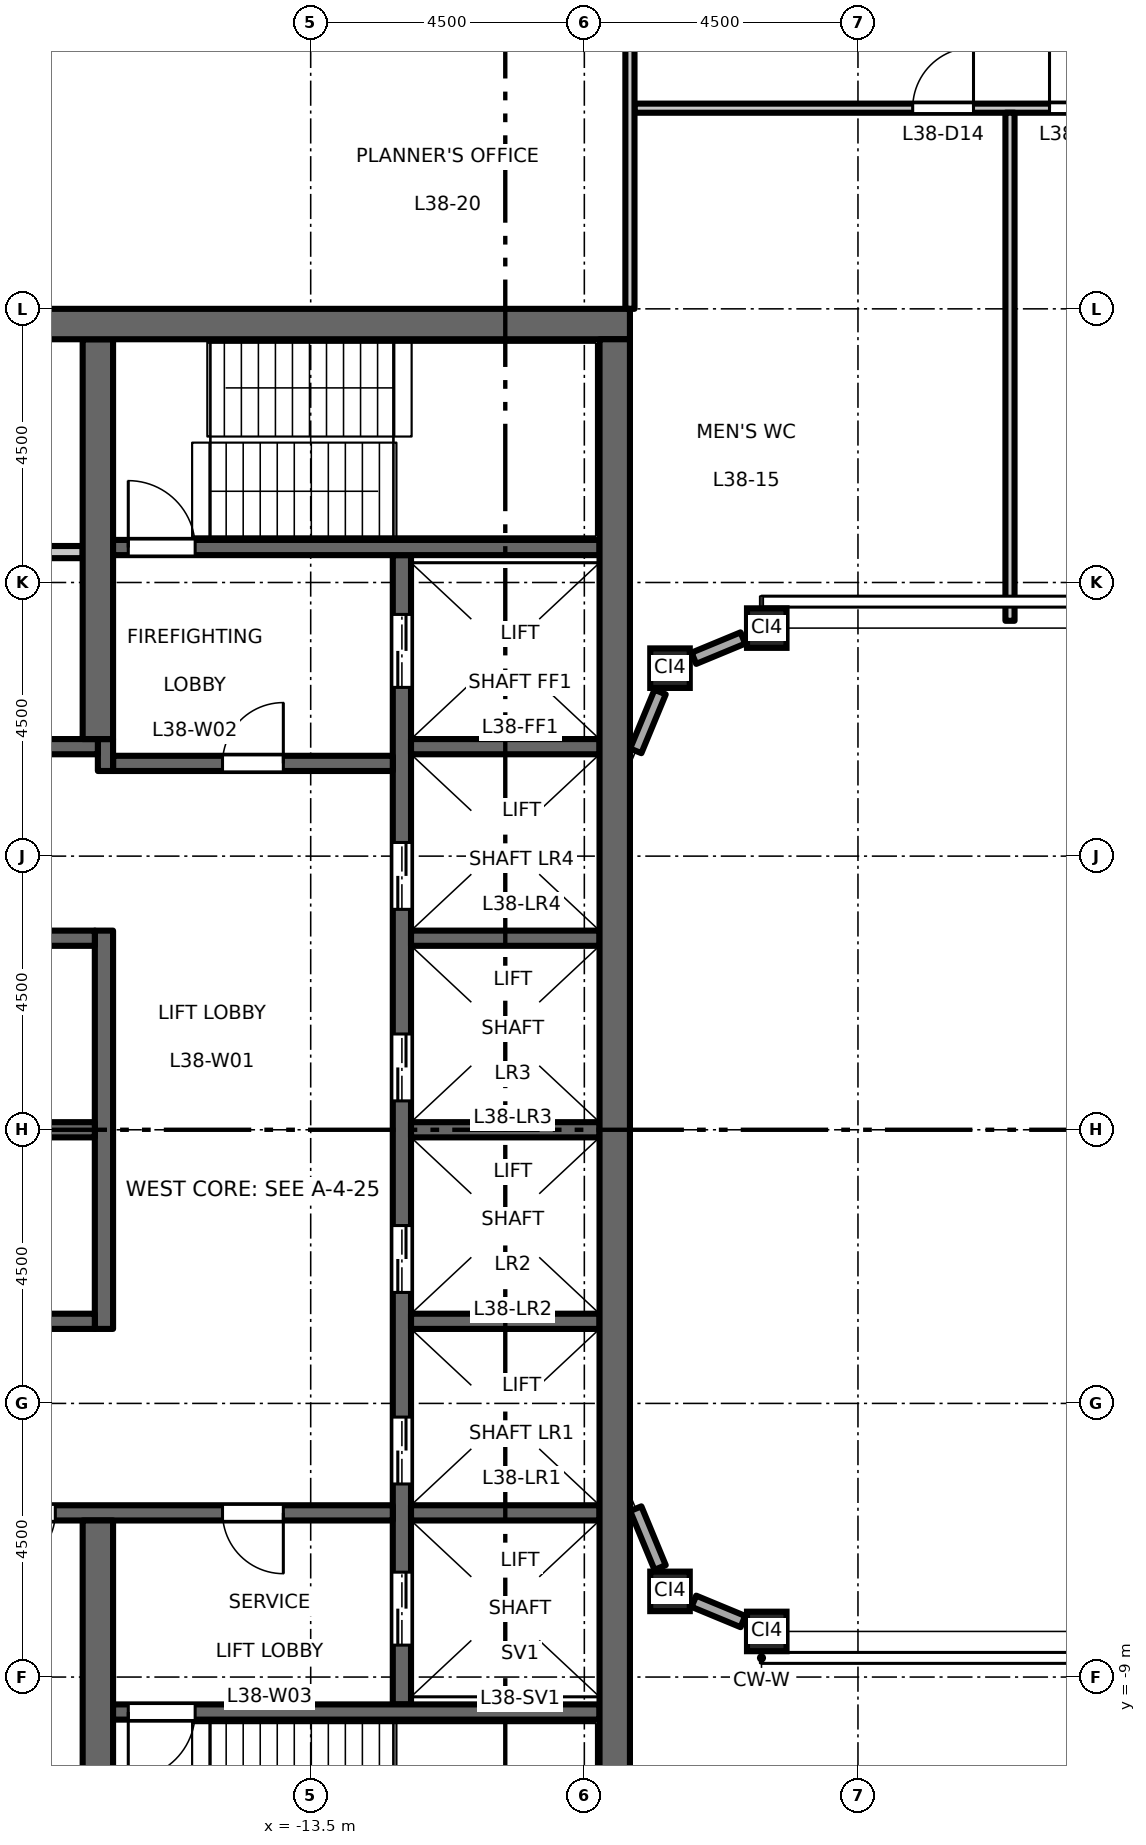
"""IFC4 building model, lengths in metres.
Left out: names, types, materials, properties, quantities, classifications, styles, units other than length and angle.
Written with IfcOpenShell. Run it as: python <this file> out.ifc"""

import sys

from ifc_helpers import new_model, si_unit, direction, frame, frame_2d, origin, origin_2d, place, context, subcontext, project, spatial, rectangle, hollow_rectangle, extrude, element, fill, save


model = new_model("IFC4")
c1 = context("Model", 3, precision=1e-05, world=origin(), true_north=direction((0.0, 1.0)))
c2 = subcontext(c1, "Body", "Model", "MODEL_VIEW")
j1 = project(units=[si_unit("LENGTHUNIT", "METRE"), si_unit("PLANEANGLEUNIT", "RADIAN")], contexts=[c1])
p1 = place(None, origin())
s1 = spatial("IfcSite", under=j1, at=p1, CompositionType="ELEMENT")
p2 = place(p1, origin())
s2 = spatial("IfcBuilding", under=s1, at=p2, CompositionType="ELEMENT")
p3 = place(p2, frame((0.0, 0.0, 176.7)))
s3 = spatial("IfcBuildingStorey", under=s2, at=p3, CompositionType="ELEMENT", Elevation=176.7)
for number, where, z_axis, x_axis in (
    (1, (-7.591, -7.591, 0.0), (0.0, 0.0, 1.0), (1.0, 0.0, 0.0)),
    (2, (-6.0, -8.25, 0.0), (0.0, 0.0, 1.0), (1.0, 0.0, 0.0)),
    (3, (-7.591, 7.591, 0.0), (0.0, 0.0, 1.0), (1.0, 0.0, 0.0)),
    (4, (-6.0, 8.25, 0.0), (0.0, 0.0, 1.0), (1.0, 0.0, 0.0)),
):
    element("IfcColumn", number, at=place(p3, frame(where, z_axis=z_axis, x_axis=x_axis)), inside=s3, PredefinedType="COLUMN", context=c2, shape_type="SweptSolid", body=[
        extrude(hollow_rectangle(XDim=0.65, YDim=0.65, WallThickness=0.036, at=origin_2d()), origin(), (0.0, 0.0, 1.0), 4.5),
    ])
p4 = place(p3, frame((-12.0, -9.45, 0.0), z_axis=(0.0, 0.0, 1.0), x_axis=(0.0, 1.0, 0.0)))
e5 = element("IfcWall", 5, at=p4, inside=s3, PredefinedType="SHEAR", context=c2, shape_type="SweptSolid", body=[
    extrude(rectangle(XDim=18.9, YDim=0.3, at=frame_2d((9.45, 0.0))), origin(), (0.0, 0.0, 1.0), 4.3),
])
p5 = place(p4, frame((3.625, 0.0, 0.0)))
e6 = element("IfcOpeningElement", 6, at=p5, cuts=e5, PredefinedType="OPENING", context=c2, shape_type="SweptSolid", body=[
    extrude(rectangle(XDim=1.1, YDim=2.1, at=frame_2d((0.55, 1.05))), frame((0.0, 0.16, 0.0), z_axis=(0.0, -1.0, 0.0), x_axis=(1.0, 0.0, 0.0)), (0.0, 0.0, 1.0), 0.32),
])
p6 = place(p4, frame((6.775, 0.0, 0.0)))
e7 = element("IfcOpeningElement", 7, at=p6, cuts=e5, PredefinedType="OPENING", context=c2, shape_type="SweptSolid", body=[
    extrude(rectangle(XDim=1.1, YDim=2.1, at=frame_2d((0.55, 1.05))), frame((0.0, 0.16, 0.0), z_axis=(0.0, -1.0, 0.0), x_axis=(1.0, 0.0, 0.0)), (0.0, 0.0, 1.0), 0.32),
])
p7 = place(p4, frame((9.925, 0.0, 0.0)))
e8 = element("IfcOpeningElement", 8, at=p7, cuts=e5, PredefinedType="OPENING", context=c2, shape_type="SweptSolid", body=[
    extrude(rectangle(XDim=1.1, YDim=2.1, at=frame_2d((0.55, 1.05))), frame((0.0, 0.16, 0.0), z_axis=(0.0, -1.0, 0.0), x_axis=(1.0, 0.0, 0.0)), (0.0, 0.0, 1.0), 0.32),
])
p8 = place(p4, frame((13.075, 0.0, 0.0)))
e9 = element("IfcOpeningElement", 9, at=p8, cuts=e5, PredefinedType="OPENING", context=c2, shape_type="SweptSolid", body=[
    extrude(rectangle(XDim=1.1, YDim=2.1, at=frame_2d((0.55, 1.05))), frame((0.0, 0.16, 0.0), z_axis=(0.0, -1.0, 0.0), x_axis=(1.0, 0.0, 0.0)), (0.0, 0.0, 1.0), 0.32),
])
p9 = place(p4, frame((16.725, 0.0, 0.0)))
e10 = element("IfcOpeningElement", 10, at=p9, cuts=e5, PredefinedType="OPENING", context=c2, shape_type="SweptSolid", body=[
    extrude(rectangle(XDim=1.2, YDim=2.1, at=frame_2d((0.6, 1.05))), frame((0.0, 0.16, 0.0), z_axis=(0.0, -1.0, 0.0), x_axis=(1.0, 0.0, 0.0)), (0.0, 0.0, 1.0), 0.32),
])
p10 = place(p4, frame((0.975, 0.0, 0.0)))
e11 = element("IfcOpeningElement", 11, at=p10, cuts=e5, PredefinedType="OPENING", context=c2, shape_type="SweptSolid", body=[
    extrude(rectangle(XDim=1.2, YDim=2.1, at=frame_2d((0.6, 1.05))), frame((0.0, 0.16, 0.0), z_axis=(0.0, -1.0, 0.0), x_axis=(1.0, 0.0, 0.0)), (0.0, 0.0, 1.0), 0.32),
])
p11 = place(p3, frame((-12.15, 6.025, 0.0), z_axis=(0.0, 0.0, 1.0), x_axis=(-1.0, 0.0, 0.0)))
e12 = element("IfcWall", 12, at=p11, inside=s3, PredefinedType="SHEAR", context=c2, shape_type="SweptSolid", body=[
    extrude(rectangle(XDim=4.6, YDim=0.25, at=frame_2d((2.3, 0.0))), origin(), (0.0, 0.0, 1.0), 4.3),
])
p12 = place(p11, frame((1.8, 0.0, 0.0)))
e13 = element("IfcOpeningElement", 13, at=p12, cuts=e12, PredefinedType="OPENING", context=c2, shape_type="SweptSolid", body=[
    extrude(rectangle(XDim=1.0, YDim=2.1, at=frame_2d((0.5, 1.05))), frame((0.0, 0.135, 0.0), z_axis=(0.0, -1.0, 0.0), x_axis=(1.0, 0.0, 0.0)), (0.0, 0.0, 1.0), 0.27),
])
p13 = place(p3, frame((-16.875, 5.9, 0.0), z_axis=(0.0, 0.0, 1.0), x_axis=(0.0, 1.0, 0.0)))
e14 = element("IfcWall", 14, at=p13, inside=s3, PredefinedType="SHEAR", context=c2, shape_type="SweptSolid", body=[
    extrude(rectangle(XDim=0.525, YDim=0.25, at=frame_2d((0.263, 0.0))), origin(), (0.0, 0.0, 1.0), 4.3),
])
p14 = place(p3, frame((-17.0, 6.3, 0.0), z_axis=(0.0, 0.0, 1.0), x_axis=(-1.0, 0.0, 0.0)))
e15 = element("IfcWall", 15, at=p14, inside=s3, PredefinedType="SHEAR", context=c2, shape_type="SweptSolid", body=[
    extrude(rectangle(XDim=4.25, YDim=0.25, at=frame_2d((2.125, 0.0))), origin(), (0.0, 0.0, 1.0), 4.3),
])
p15 = place(p14, frame((1.8, 0.0, 0.0)))
e16 = element("IfcOpeningElement", 16, at=p15, cuts=e15, PredefinedType="OPENING", context=c2, shape_type="SweptSolid", body=[
    extrude(rectangle(XDim=0.9, YDim=2.1, at=frame_2d((0.45, 1.05))), frame((0.0, 0.135, 0.0), z_axis=(0.0, -1.0, 0.0), x_axis=(1.0, 0.0, 0.0)), (0.0, 0.0, 1.0), 0.27),
])
p16 = place(p3, frame((-12.15, -6.3, 0.0), z_axis=(0.0, 0.0, 1.0), x_axis=(-1.0, 0.0, 0.0)))
e17 = element("IfcWall", 17, at=p16, inside=s3, PredefinedType="SHEAR", context=c2, shape_type="SweptSolid", body=[
    extrude(rectangle(XDim=9.1, YDim=0.25, at=frame_2d((4.55, 0.0))), origin(), (0.0, 0.0, 1.0), 4.3),
])
p17 = place(p16, frame((1.8, 0.0, 0.0)))
e18 = element("IfcOpeningElement", 18, at=p17, cuts=e17, PredefinedType="OPENING", context=c2, shape_type="SweptSolid", body=[
    extrude(rectangle(XDim=1.0, YDim=2.1, at=frame_2d((0.5, 1.05))), frame((0.0, 0.135, 0.0), z_axis=(0.0, -1.0, 0.0), x_axis=(1.0, 0.0, 0.0)), (0.0, 0.0, 1.0), 0.27),
])
p18 = place(p16, frame((5.55, 0.0, 0.0)))
e19 = element("IfcOpeningElement", 19, at=p18, cuts=e17, PredefinedType="OPENING", context=c2, shape_type="SweptSolid", body=[
    extrude(rectangle(XDim=0.9, YDim=2.1, at=frame_2d((0.45, 1.05))), frame((0.0, 0.135, 0.0), z_axis=(0.0, -1.0, 0.0), x_axis=(1.0, 0.0, 0.0)), (0.0, 0.0, 1.0), 0.27),
])
p19 = place(p16, frame((7.55, 0.0, 0.0)))
e20 = element("IfcOpeningElement", 20, at=p19, cuts=e17, PredefinedType="OPENING", context=c2, shape_type="SweptSolid", body=[
    extrude(rectangle(XDim=0.9, YDim=2.1, at=frame_2d((0.45, 1.05))), frame((0.0, 0.135, 0.0), z_axis=(0.0, -1.0, 0.0), x_axis=(1.0, 0.0, 0.0)), (0.0, 0.0, 1.0), 0.27),
])
p20 = place(p3, frame((-17.25, 9.5, 0.0), z_axis=(0.0, 0.0, 1.0), x_axis=(-1.0, 0.0, 0.0)))
e21 = element("IfcWall", 21, at=p20, inside=s3, PredefinedType="PARTITIONING", context=c2, shape_type="SweptSolid", body=[
    extrude(rectangle(XDim=4.0, YDim=0.2, at=frame_2d((2.0, 0.0))), origin(), (0.0, 0.0, 1.0), 4.3),
])
p21 = place(p3, frame((-16.9, -3.275, 0.0), z_axis=(0.0, 0.0, 1.0), x_axis=(0.0, 1.0, 0.0)))
e22 = element("IfcWall", 22, at=p21, inside=s3, PredefinedType="SHEAR", context=c2, shape_type="SweptSolid", body=[
    extrude(rectangle(XDim=6.55, YDim=0.3, at=frame_2d((3.275, 0.0))), origin(), (0.0, 0.0, 1.0), 4.3),
])
for number, where, z_axis, x_axis in (
    (23, (-17.05, 0.0, 0.0), (0.0, 0.0, 1.0), (-1.0, 0.0, 0.0)),
    (24, (-17.05, 3.15, 0.0), (0.0, 0.0, 1.0), (-1.0, 0.0, 0.0)),
    (25, (-17.05, -3.15, 0.0), (0.0, 0.0, 1.0), (-1.0, 0.0, 0.0)),
):
    element("IfcWall", number, at=place(p3, frame(where, z_axis=z_axis, x_axis=x_axis)), inside=s3, PredefinedType="SHEAR", context=c2, shape_type="SweptSolid", body=[
        extrude(rectangle(XDim=4.2, YDim=0.25, at=frame_2d((2.1, 0.0))), origin(), (0.0, 0.0, 1.0), 4.3),
    ])
for number, where, z_axis, x_axis in (
    (26, (-17.0, 6.425, 0.0), (0.0, 0.0, 1.0), (0.0, 1.0, 0.0)),
    (27, (-17.0, -13.0, 0.0), (0.0, 0.0, 1.0), (0.0, 1.0, 0.0)),
):
    element("IfcWall", number, at=place(p3, frame(where, z_axis=z_axis, x_axis=x_axis)), inside=s3, PredefinedType="SHEAR", context=c2, shape_type="SweptSolid", body=[
        extrude(rectangle(XDim=6.575, YDim=0.5, at=frame_2d((3.288, 0.0))), origin(), (0.0, 0.0, 1.0), 4.3),
    ])
for number, where, z_axis, x_axis in (
    (28, (-8.75, 0.0, 0.0), (0.0, 0.0, 1.0), (-1.0, 0.0, 0.0)),
    (29, (-8.75, 3.15, 0.0), (0.0, 0.0, 1.0), (-1.0, 0.0, 0.0)),
    (30, (-8.75, 6.3, 0.0), (0.0, 0.0, 1.0), (-1.0, 0.0, 0.0)),
    (31, (-8.75, -3.15, 0.0), (0.0, 0.0, 1.0), (-1.0, 0.0, 0.0)),
    (32, (-8.75, -6.3, 0.0), (0.0, 0.0, 1.0), (-1.0, 0.0, 0.0)),
):
    element("IfcWall", number, at=place(p3, frame(where, z_axis=z_axis, x_axis=x_axis)), inside=s3, PredefinedType="SHEAR", context=c2, shape_type="SweptSolid", body=[
        extrude(rectangle(XDim=3.1, YDim=0.25, at=frame_2d((1.55, 0.0))), origin(), (0.0, 0.0, 1.0), 4.3),
    ])
p22 = place(p3, frame((-8.75, 9.575, 0.0), z_axis=(0.0, 0.0, 1.0), x_axis=(-1.0, 0.0, 0.0)))
e33 = element("IfcWall", 33, at=p22, inside=s3, PredefinedType="SHEAR", context=c2, shape_type="SweptSolid", body=[
    extrude(rectangle(XDim=8.0, YDim=0.25, at=frame_2d((4.0, 0.0))), origin(), (0.0, 0.0, 1.0), 4.3),
])
p23 = place(p22, frame((6.65, 0.0, 0.0)))
e34 = element("IfcOpeningElement", 34, at=p23, cuts=e33, PredefinedType="OPENING", context=c2, shape_type="SweptSolid", body=[
    extrude(rectangle(XDim=1.1, YDim=2.1, at=frame_2d((0.55, 1.05))), frame((0.0, 0.135, 0.0), z_axis=(0.0, -1.0, 0.0), x_axis=(1.0, 0.0, 0.0)), (0.0, 0.0, 1.0), 0.27),
])
p24 = place(p3, frame((-8.75, -9.575, 0.0), z_axis=(0.0, 0.0, 1.0), x_axis=(-1.0, 0.0, 0.0)))
e35 = element("IfcWall", 35, at=p24, inside=s3, PredefinedType="SHEAR", context=c2, shape_type="SweptSolid", body=[
    extrude(rectangle(XDim=8.0, YDim=0.25, at=frame_2d((4.0, 0.0))), origin(), (0.0, 0.0, 1.0), 4.3),
])
p25 = place(p24, frame((6.65, 0.0, 0.0)))
e36 = element("IfcOpeningElement", 36, at=p25, cuts=e35, PredefinedType="OPENING", context=c2, shape_type="SweptSolid", body=[
    extrude(rectangle(XDim=1.1, YDim=2.1, at=frame_2d((0.55, 1.05))), frame((0.0, 0.135, 0.0), z_axis=(0.0, -1.0, 0.0), x_axis=(1.0, 0.0, 0.0)), (0.0, 0.0, 1.0), 0.27),
])
p26 = place(p3, frame((-8.25, 13.25, 0.0), z_axis=(0.0, 0.0, 1.0), x_axis=(-1.0, 0.0, 0.0)))
e37 = element("IfcWall", 37, at=p26, inside=s3, PredefinedType="SHEAR", context=c2, shape_type="SweptSolid", body=[
    extrude(rectangle(XDim=13.5, YDim=0.5, at=frame_2d((6.75, 0.0))), origin(), (0.0, 0.0, 1.0), 4.3),
])
p27 = place(p3, frame((-8.5, -13.0, 0.0), z_axis=(0.0, 0.0, 1.0), x_axis=(0.0, 1.0, 0.0)))
e38 = element("IfcWall", 38, at=p27, inside=s3, PredefinedType="SHEAR", context=c2, shape_type="SweptSolid", body=[
    extrude(rectangle(XDim=26.0, YDim=0.5, at=frame_2d((13.0, 0.0))), origin(), (0.0, 0.0, 1.0), 4.3),
])
p28 = place(p3, frame((-6.392, 8.087, 0.0), z_axis=(0.0, 0.0, 1.0), x_axis=(-0.923894108428, -0.382648241093, 0.0)))
e39 = element("IfcWall", 39, at=p28, inside=s3, PredefinedType="STANDARD", context=c2, shape_type="SweptSolid", body=[
    extrude(rectangle(XDim=0.873, YDim=0.2, at=frame_2d((0.437, 0.0))), origin(), (0.0, 0.0, 1.0), 3.776),
])
for number, where, z_axis, x_axis in (
    (40, (-7.753, 7.199, 0.0), (0.0, 0.0, 1.0), (-0.383, -0.924, 0.0)),
    (41, (-8.154, -6.231, 0.0), (0.0, 0.0, 1.0), (0.383, -0.924, 0.0)),
):
    element("IfcWall", number, at=place(p3, frame(where, z_axis=z_axis, x_axis=x_axis)), inside=s3, PredefinedType="STANDARD", context=c2, shape_type="SweptSolid", body=[
        extrude(rectangle(XDim=1.048, YDim=0.2, at=frame_2d((0.524, 0.0))), origin(), (0.0, 0.0, 1.0), 3.776),
    ])
p29 = place(p3, frame((-7.199, -7.753, 0.0), z_axis=(0.0, 0.0, 1.0), x_axis=(0.923894108428, -0.382648241093, 0.0)))
e42 = element("IfcWall", 42, at=p29, inside=s3, PredefinedType="STANDARD", context=c2, shape_type="SweptSolid", body=[
    extrude(rectangle(XDim=0.873, YDim=0.2, at=frame_2d((0.437, 0.0))), origin(), (0.0, 0.0, 1.0), 3.776),
])
p30 = place(p3, frame((-8.175, 16.8, 0.0), z_axis=(0.0, 0.0, 1.0), x_axis=(1.0, 0.0, 0.0)))
e43 = element("IfcWall", 43, at=p30, inside=s3, PredefinedType="PARTITIONING", context=c2, shape_type="SweptSolid", body=[
    extrude(rectangle(XDim=15.095, YDim=0.15, at=frame_2d((7.547, 0.0))), origin(), (0.0, 0.0, 1.0), 4.3),
])
p31 = place(p30, frame((4.575, 0.0, 0.0)))
e44 = element("IfcOpeningElement", 44, at=p31, cuts=e43, PredefinedType="OPENING", context=c2, shape_type="SweptSolid", body=[
    extrude(rectangle(XDim=1.0, YDim=2.1, at=frame_2d((0.5, 1.05))), frame((0.0, 0.085, 0.0), z_axis=(0.0, -1.0, 0.0), x_axis=(1.0, 0.0, 0.0)), (0.0, 0.0, 1.0), 0.17),
])
p32 = place(p30, frame((6.825, 0.0, 0.0)))
e45 = element("IfcOpeningElement", 45, at=p32, cuts=e43, PredefinedType="OPENING", context=c2, shape_type="SweptSolid", body=[
    extrude(rectangle(XDim=1.0, YDim=2.1, at=frame_2d((0.5, 1.05))), frame((0.0, 0.085, 0.0), z_axis=(0.0, -1.0, 0.0), x_axis=(1.0, 0.0, 0.0)), (0.0, 0.0, 1.0), 0.17),
])
p33 = place(p30, frame((13.575, 0.0, 0.0)))
e46 = element("IfcOpeningElement", 46, at=p33, cuts=e43, PredefinedType="OPENING", context=c2, shape_type="SweptSolid", body=[
    extrude(rectangle(XDim=1.0, YDim=2.1, at=frame_2d((0.5, 1.05))), frame((0.0, 0.085, 0.0), z_axis=(0.0, -1.0, 0.0), x_axis=(1.0, 0.0, 0.0)), (0.0, 0.0, 1.0), 0.17),
])
p34 = place(p3, frame((-8.25, 13.5, 0.0), z_axis=(0.0, 0.0, 1.0), x_axis=(0.0, 1.0, 0.0)))
e47 = element("IfcWall", 47, at=p34, inside=s3, PredefinedType="PARTITIONING", context=c2, shape_type="SweptSolid", body=[
    extrude(rectangle(XDim=5.425, YDim=0.15, at=frame_2d((2.712, 0.0))), origin(), (0.0, 0.0, 1.0), 4.3),
])
p35 = place(p3, frame((-2.0, 8.37, 0.0), z_axis=(0.0, 0.0, 1.0), x_axis=(0.0, 1.0, 0.0)))
e48 = element("IfcWall", 48, at=p35, inside=s3, PredefinedType="PARTITIONING", context=c2, shape_type="SweptSolid", body=[
    extrude(rectangle(XDim=8.355, YDim=0.15, at=frame_2d((4.177, 0.0))), origin(), (0.0, 0.0, 1.0), 4.3),
])
p36 = place(p12, origin())
e49 = element("IfcDoor", 49, at=p36, inside=s3, OperationType="SINGLE_SWING_LEFT", PredefinedType="DOOR", context=c2, shape_type="SweptSolid", body=[
    extrude(rectangle(XDim=1.0, YDim=2.1, at=frame_2d((0.5, 1.05))), frame((0.0, 0.025, 0.0), z_axis=(0.0, -1.0, 0.0), x_axis=(1.0, 0.0, 0.0)), (0.0, 0.0, 1.0), 0.05),
])
fill(e13, e49)
p37 = place(p17, origin())
e50 = element("IfcDoor", 50, at=p37, inside=s3, OperationType="SINGLE_SWING_RIGHT", PredefinedType="DOOR", context=c2, shape_type="SweptSolid", body=[
    extrude(rectangle(XDim=1.0, YDim=2.1, at=frame_2d((0.5, 1.05))), frame((0.0, 0.025, 0.0), z_axis=(0.0, -1.0, 0.0), x_axis=(1.0, 0.0, 0.0)), (0.0, 0.0, 1.0), 0.05),
])
fill(e18, e50)
p38 = place(p23, origin())
e51 = element("IfcDoor", 51, at=p38, inside=s3, OperationType="SINGLE_SWING_RIGHT", PredefinedType="DOOR", context=c2, shape_type="SweptSolid", body=[
    extrude(rectangle(XDim=1.1, YDim=2.1, at=frame_2d((0.55, 1.05))), frame((0.0, 0.025, 0.0), z_axis=(0.0, -1.0, 0.0), x_axis=(1.0, 0.0, 0.0)), (0.0, 0.0, 1.0), 0.05),
])
fill(e34, e51)
p39 = place(p25, origin())
e52 = element("IfcDoor", 52, at=p39, inside=s3, OperationType="SINGLE_SWING_LEFT", PredefinedType="DOOR", context=c2, shape_type="SweptSolid", body=[
    extrude(rectangle(XDim=1.1, YDim=2.1, at=frame_2d((0.55, 1.05))), frame((0.0, 0.025, 0.0), z_axis=(0.0, -1.0, 0.0), x_axis=(1.0, 0.0, 0.0)), (0.0, 0.0, 1.0), 0.05),
])
fill(e36, e52)
p40 = place(p5, origin())
e53 = element("IfcDoor", 53, at=p40, inside=s3, OperationType="DOUBLE_DOOR_SLIDING", PredefinedType="DOOR", context=c2, shape_type="SweptSolid", body=[
    extrude(rectangle(XDim=1.1, YDim=2.1, at=frame_2d((0.55, 1.05))), frame((0.0, 0.025, 0.0), z_axis=(0.0, -1.0, 0.0), x_axis=(1.0, 0.0, 0.0)), (0.0, 0.0, 1.0), 0.05),
])
fill(e6, e53)
p41 = place(p6, origin())
e54 = element("IfcDoor", 54, at=p41, inside=s3, OperationType="DOUBLE_DOOR_SLIDING", PredefinedType="DOOR", context=c2, shape_type="SweptSolid", body=[
    extrude(rectangle(XDim=1.1, YDim=2.1, at=frame_2d((0.55, 1.05))), frame((0.0, 0.025, 0.0), z_axis=(0.0, -1.0, 0.0), x_axis=(1.0, 0.0, 0.0)), (0.0, 0.0, 1.0), 0.05),
])
fill(e7, e54)
p42 = place(p7, origin())
e55 = element("IfcDoor", 55, at=p42, inside=s3, OperationType="DOUBLE_DOOR_SLIDING", PredefinedType="DOOR", context=c2, shape_type="SweptSolid", body=[
    extrude(rectangle(XDim=1.1, YDim=2.1, at=frame_2d((0.55, 1.05))), frame((0.0, 0.025, 0.0), z_axis=(0.0, -1.0, 0.0), x_axis=(1.0, 0.0, 0.0)), (0.0, 0.0, 1.0), 0.05),
])
fill(e8, e55)
p43 = place(p8, origin())
e56 = element("IfcDoor", 56, at=p43, inside=s3, OperationType="DOUBLE_DOOR_SLIDING", PredefinedType="DOOR", context=c2, shape_type="SweptSolid", body=[
    extrude(rectangle(XDim=1.1, YDim=2.1, at=frame_2d((0.55, 1.05))), frame((0.0, 0.025, 0.0), z_axis=(0.0, -1.0, 0.0), x_axis=(1.0, 0.0, 0.0)), (0.0, 0.0, 1.0), 0.05),
])
fill(e9, e56)
p44 = place(p9, origin())
e57 = element("IfcDoor", 57, at=p44, inside=s3, OperationType="DOUBLE_DOOR_SLIDING", PredefinedType="DOOR", context=c2, shape_type="SweptSolid", body=[
    extrude(rectangle(XDim=1.2, YDim=2.1, at=frame_2d((0.6, 1.05))), frame((0.0, 0.025, 0.0), z_axis=(0.0, -1.0, 0.0), x_axis=(1.0, 0.0, 0.0)), (0.0, 0.0, 1.0), 0.05),
])
fill(e10, e57)
p45 = place(p10, origin())
e58 = element("IfcDoor", 58, at=p45, inside=s3, OperationType="DOUBLE_DOOR_SLIDING", PredefinedType="DOOR", context=c2, shape_type="SweptSolid", body=[
    extrude(rectangle(XDim=1.2, YDim=2.1, at=frame_2d((0.6, 1.05))), frame((0.0, 0.025, 0.0), z_axis=(0.0, -1.0, 0.0), x_axis=(1.0, 0.0, 0.0)), (0.0, 0.0, 1.0), 0.05),
])
fill(e11, e58)
p46 = place(p18, origin())
e59 = element("IfcDoor", 59, at=p46, inside=s3, OperationType="SINGLE_SWING_LEFT", PredefinedType="DOOR", context=c2, shape_type="SweptSolid", body=[
    extrude(rectangle(XDim=0.9, YDim=2.1, at=frame_2d((0.45, 1.05))), frame((0.0, 0.025, 0.0), z_axis=(0.0, -1.0, 0.0), x_axis=(1.0, 0.0, 0.0)), (0.0, 0.0, 1.0), 0.05),
])
fill(e19, e59)
p47 = place(p31, origin())
e60 = element("IfcDoor", 60, at=p47, inside=s3, OperationType="SINGLE_SWING_RIGHT", PredefinedType="DOOR", context=c2, shape_type="SweptSolid", body=[
    extrude(rectangle(XDim=1.0, YDim=2.1, at=frame_2d((0.5, 1.05))), frame((0.0, 0.025, 0.0), z_axis=(0.0, -1.0, 0.0), x_axis=(1.0, 0.0, 0.0)), (0.0, 0.0, 1.0), 0.05),
])
fill(e44, e60)
p48 = place(p32, origin())
e61 = element("IfcDoor", 61, at=p48, inside=s3, OperationType="SINGLE_SWING_LEFT", PredefinedType="DOOR", context=c2, shape_type="SweptSolid", body=[
    extrude(rectangle(XDim=1.0, YDim=2.1, at=frame_2d((0.5, 1.05))), frame((0.0, 0.025, 0.0), z_axis=(0.0, -1.0, 0.0), x_axis=(1.0, 0.0, 0.0)), (0.0, 0.0, 1.0), 0.05),
])
fill(e45, e61)
save(model, sys.argv[1])
